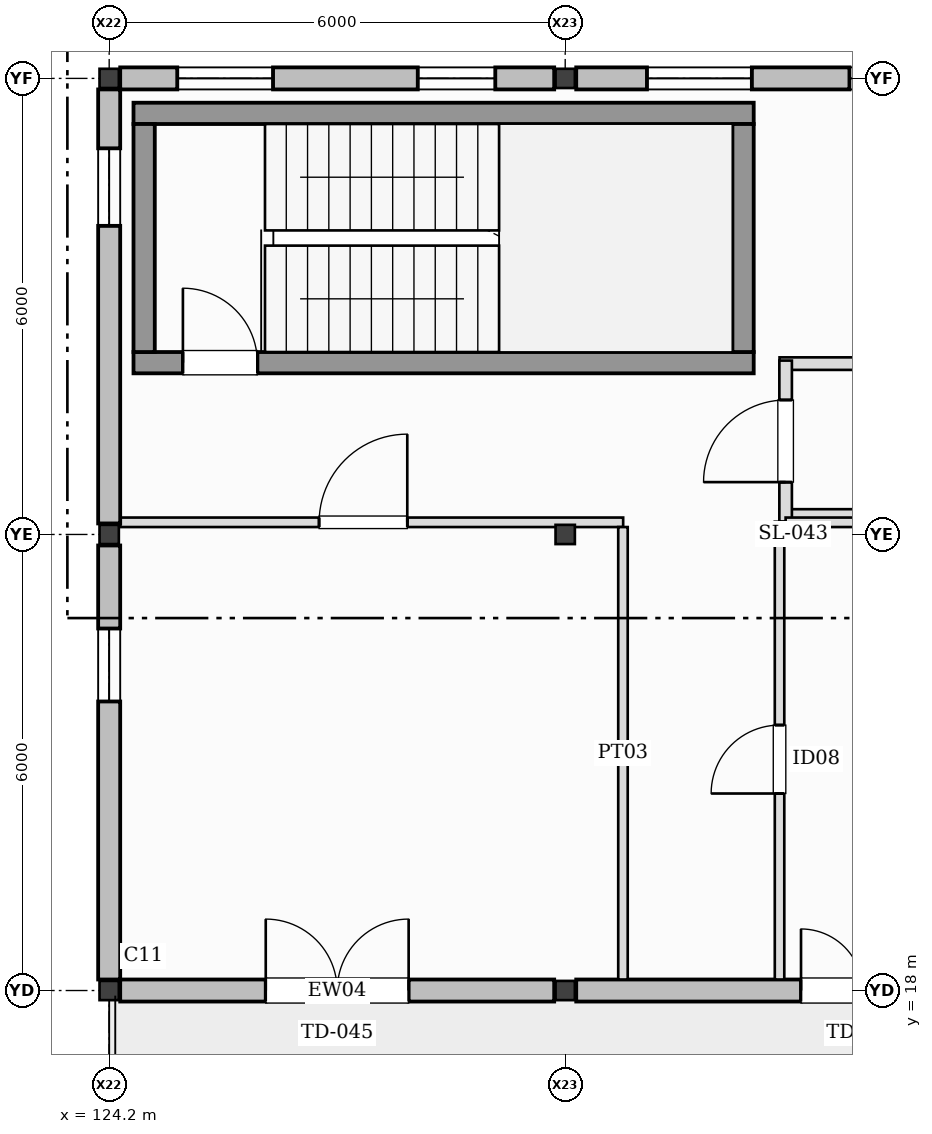
"""IFC4 building model, lengths in metres.
Left out: names, types, materials, properties, quantities, classifications, styles, units other than length and angle.
Written with IfcOpenShell. Run it as: python <this file> out.ifc"""

import sys

from ifc_helpers import new_model, si_unit, direction, frame, frame_2d, origin, origin_2d, place, context, subcontext, project, spatial, rectangle, i_section, extrude, element, fill, save


model = new_model("IFC4")
c1 = context("Model", 3, precision=1e-05, world=origin(), true_north=direction((0.0, 1.0)))
c2 = subcontext(c1, "Body", "Model", "MODEL_VIEW")
j1 = project(units=[si_unit("LENGTHUNIT", "METRE"), si_unit("PLANEANGLEUNIT", "RADIAN")], contexts=[c1])
p1 = place(None, origin())
s1 = spatial("IfcSite", under=j1, at=p1, CompositionType="ELEMENT")
p2 = place(p1, origin())
s2 = spatial("IfcBuilding", under=s1, at=p2, CompositionType="ELEMENT")
p3 = place(p2, frame((0.0, 0.0, 10.0)))
s3 = spatial("IfcBuildingStorey", under=s2, at=p3, CompositionType="ELEMENT", Elevation=10.0)
for number, where, z_axis, x_axis in (
    (1, (124.2, 18.0, 0.0), (0.0, 0.0, 1.0), (1.0, 0.0, 0.0)),
    (2, (124.2, 24.0, 0.0), (0.0, 0.0, 1.0), (1.0, 0.0, 0.0)),
    (3, (124.2, 30.0, 0.0), (0.0, 0.0, 1.0), (1.0, 0.0, 0.0)),
    (4, (130.2, 18.0, 0.0), (0.0, 0.0, 1.0), (1.0, 0.0, 0.0)),
    (5, (130.2, 24.0, 0.0), (0.0, 0.0, 1.0), (1.0, 0.0, 0.0)),
    (6, (130.2, 30.0, 0.0), (0.0, 0.0, 1.0), (1.0, 0.0, 0.0)),
):
    element("IfcColumn", number, at=place(p3, frame(where, z_axis=z_axis, x_axis=x_axis)), inside=s3, PredefinedType="COLUMN", context=c2, shape_type="SweptSolid", body=[
        extrude(i_section(OverallWidth=0.254, OverallDepth=0.253, WebThickness=0.009, FlangeThickness=0.014, at=origin_2d()), origin(), (0.0, 0.0, 1.0), 4.0),
    ])
p4 = place(p3, frame((124.345, 18.0, 0.0), z_axis=(0.0, 0.0, 1.0), x_axis=(1.0, 0.0, 0.0)))
e7 = element("IfcWall", 7, at=p4, inside=s3, PredefinedType="STANDARD", context=c2, shape_type="SweptSolid", body=[
    extrude(rectangle(XDim=5.71, YDim=0.29, at=frame_2d((2.855, 0.0))), origin(), (0.0, 0.0, 1.0), 4.0),
])
p5 = place(p4, frame((1.915, 0.0, 0.0)))
e8 = element("IfcOpeningElement", 8, at=p5, cuts=e7, PredefinedType="OPENING", context=c2, shape_type="SweptSolid", body=[
    extrude(rectangle(XDim=1.88, YDim=2.28, at=frame_2d((0.94, 1.14))), frame((0.0, 0.155, 0.0), z_axis=(0.0, -1.0, 0.0), x_axis=(1.0, 0.0, 0.0)), (0.0, 0.0, 1.0), 0.31),
])
p6 = place(p3, frame((130.345, 18.0, 0.0), z_axis=(0.0, 0.0, 1.0), x_axis=(1.0, 0.0, 0.0)))
e9 = element("IfcWall", 9, at=p6, inside=s3, PredefinedType="STANDARD", context=c2, shape_type="SweptSolid", body=[
    extrude(rectangle(XDim=5.71, YDim=0.29, at=frame_2d((2.855, 0.0))), origin(), (0.0, 0.0, 1.0), 4.0),
])
p7 = place(p6, frame((2.958, 0.0, 0.0)))
e10 = element("IfcOpeningElement", 10, at=p7, cuts=e9, PredefinedType="OPENING", context=c2, shape_type="SweptSolid", body=[
    extrude(rectangle(XDim=1.62, YDim=2.2, at=frame_2d((0.81, 1.1))), frame((0.0, 0.155, 0.0), z_axis=(0.0, -1.0, 0.0), x_axis=(1.0, 0.0, 0.0)), (0.0, 0.0, 1.0), 0.31),
])
p8 = place(p3, frame((130.055, 30.0, 0.0), z_axis=(0.0, 0.0, 1.0), x_axis=(-1.0, 0.0, 0.0)))
e11 = element("IfcWall", 11, at=p8, inside=s3, PredefinedType="STANDARD", context=c2, shape_type="SweptSolid", body=[
    extrude(rectangle(XDim=5.71, YDim=0.29, at=frame_2d((2.855, 0.0))), origin(), (0.0, 0.0, 1.0), 4.0),
])
p9 = place(p8, frame((0.775, 0.0, 1.18)))
e12 = element("IfcOpeningElement", 12, at=p9, cuts=e11, PredefinedType="OPENING", context=c2, shape_type="SweptSolid", body=[
    extrude(rectangle(XDim=1.02, YDim=1.02, at=frame_2d((0.51, 0.51))), frame((0.0, 0.155, 0.0), z_axis=(0.0, -1.0, 0.0), x_axis=(1.0, 0.0, 0.0)), (0.0, 0.0, 1.0), 0.31),
])
p10 = place(p8, frame((3.699, 0.0, 0.96)))
e13 = element("IfcOpeningElement", 13, at=p10, cuts=e11, PredefinedType="OPENING", context=c2, shape_type="SweptSolid", body=[
    extrude(rectangle(XDim=1.26, YDim=1.26, at=frame_2d((0.63, 0.63))), frame((0.0, 0.155, 0.0), z_axis=(0.0, -1.0, 0.0), x_axis=(1.0, 0.0, 0.0)), (0.0, 0.0, 1.0), 0.31),
])
p11 = place(p3, frame((136.055, 30.0, 0.0), z_axis=(0.0, 0.0, 1.0), x_axis=(-1.0, 0.0, 0.0)))
e14 = element("IfcWall", 14, at=p11, inside=s3, PredefinedType="STANDARD", context=c2, shape_type="SweptSolid", body=[
    extrude(rectangle(XDim=5.71, YDim=0.29, at=frame_2d((2.855, 0.0))), origin(), (0.0, 0.0, 1.0), 4.0),
])
p12 = place(p11, frame((0.975, 0.0, 1.42)))
e15 = element("IfcOpeningElement", 15, at=p12, cuts=e14, PredefinedType="OPENING", context=c2, shape_type="SweptSolid", body=[
    extrude(rectangle(XDim=1.14, YDim=1.14, at=frame_2d((0.57, 0.57))), frame((0.0, 0.155, 0.0), z_axis=(0.0, -1.0, 0.0), x_axis=(1.0, 0.0, 0.0)), (0.0, 0.0, 1.0), 0.31),
])
p13 = place(p11, frame((3.399, 0.0, 1.28)))
e16 = element("IfcOpeningElement", 16, at=p13, cuts=e14, PredefinedType="OPENING", context=c2, shape_type="SweptSolid", body=[
    extrude(rectangle(XDim=1.38, YDim=1.38, at=frame_2d((0.69, 0.69))), frame((0.0, 0.155, 0.0), z_axis=(0.0, -1.0, 0.0), x_axis=(1.0, 0.0, 0.0)), (0.0, 0.0, 1.0), 0.31),
])
p14 = place(p3, frame((124.2, 23.855, 0.0), z_axis=(0.0, 0.0, 1.0), x_axis=(0.0, -1.0, 0.0)))
e17 = element("IfcWall", 17, at=p14, inside=s3, PredefinedType="STANDARD", context=c2, shape_type="SweptSolid", body=[
    extrude(rectangle(XDim=5.71, YDim=0.29, at=frame_2d((2.855, 0.0))), origin(), (0.0, 0.0, 1.0), 2.1),
])
p15 = place(p14, frame((1.092, 0.0, 0.82)))
e18 = element("IfcOpeningElement", 18, at=p15, cuts=e17, PredefinedType="OPENING", context=c2, shape_type="SweptSolid", body=[
    extrude(rectangle(XDim=0.96, YDim=0.96, at=frame_2d((0.48, 0.48))), frame((0.0, 0.155, 0.0), z_axis=(0.0, -1.0, 0.0), x_axis=(1.0, 0.0, 0.0)), (0.0, 0.0, 1.0), 0.31),
])
p16 = place(p3, frame((124.2, 29.855, 0.0), z_axis=(0.0, 0.0, 1.0), x_axis=(0.0, -1.0, 0.0)))
e19 = element("IfcWall", 19, at=p16, inside=s3, PredefinedType="STANDARD", context=c2, shape_type="SweptSolid", body=[
    extrude(rectangle(XDim=5.71, YDim=0.29, at=frame_2d((2.855, 0.0))), origin(), (0.0, 0.0, 1.0), 2.1),
])
p17 = place(p16, frame((0.775, 0.0, 0.82)))
e20 = element("IfcOpeningElement", 20, at=p17, cuts=e19, PredefinedType="OPENING", context=c2, shape_type="SweptSolid", body=[
    extrude(rectangle(XDim=1.02, YDim=1.02, at=frame_2d((0.51, 0.51))), frame((0.0, 0.155, 0.0), z_axis=(0.0, -1.0, 0.0), x_axis=(1.0, 0.0, 0.0)), (0.0, 0.0, 1.0), 0.31),
])
p18 = place(p2, frame((0.0, 0.0, 25.2)))
s4 = spatial("IfcBuildingStorey", under=s2, at=p18, CompositionType="ELEMENT", Elevation=25.2)
for number, where, z_axis, x_axis in (
    (21, (122.973, 18.0, -15.2), (0.0, 0.0, 1.0), (1.0, 0.0, 0.0)),
    (22, (124.155, 30.0, -15.2), (0.0, 0.0, 1.0), (-1.0, 0.0, 0.0)),
):
    element("IfcWall", number, at=place(p18, frame(where, z_axis=z_axis, x_axis=x_axis)), inside=s4, PredefinedType="STANDARD", context=c2, shape_type="SweptSolid", body=[
        extrude(rectangle(XDim=1.182, YDim=0.265, at=frame_2d((0.591, 0.0))), origin(), (0.0, 0.0, 1.0), 2.417),
    ])
p19 = place(p3, frame((124.52, 26.26, 0.0), z_axis=(0.0, 0.0, 1.0), x_axis=(1.0, 0.0, 0.0)))
e23 = element("IfcWall", 23, at=p19, inside=s3, PredefinedType="SHEAR", context=c2, shape_type="SweptSolid", body=[
    extrude(rectangle(XDim=8.16, YDim=0.28, at=frame_2d((4.08, 0.0))), origin(), (0.0, 0.0, 1.0), 3.75),
])
p20 = place(p19, frame((0.65, 0.0, 0.0)))
e24 = element("IfcOpeningElement", 24, at=p20, cuts=e23, PredefinedType="OPENING", context=c2, shape_type="SweptSolid", body=[
    extrude(rectangle(XDim=0.98, YDim=2.15, at=frame_2d((0.49, 1.075))), frame((0.0, 0.15, 0.0), z_axis=(0.0, -1.0, 0.0), x_axis=(1.0, 0.0, 0.0)), (0.0, 0.0, 1.0), 0.3),
])
p21 = place(p3, frame((132.68, 29.54, 0.0), z_axis=(0.0, 0.0, 1.0), x_axis=(-1.0, 0.0, 0.0)))
e25 = element("IfcWall", 25, at=p21, inside=s3, PredefinedType="SHEAR", context=c2, shape_type="SweptSolid", body=[
    extrude(rectangle(XDim=8.16, YDim=0.28, at=frame_2d((4.08, 0.0))), origin(), (0.0, 0.0, 1.0), 3.75),
])
for number, where, z_axis, x_axis in (
    (26, (124.66, 29.4, 0.0), (0.0, 0.0, 1.0), (0.0, -1.0, 0.0)),
    (27, (132.54, 26.4, 0.0), (0.0, 0.0, 1.0), (0.0, 1.0, 0.0)),
):
    element("IfcWall", number, at=place(p3, frame(where, z_axis=z_axis, x_axis=x_axis)), inside=s3, PredefinedType="SHEAR", context=c2, shape_type="SweptSolid", body=[
        extrude(rectangle(XDim=3.0, YDim=0.28, at=frame_2d((1.5, 0.0))), origin(), (0.0, 0.0, 1.0), 3.75),
    ])
p22 = place(p3, frame((133.02, 24.25, 0.0), z_axis=(0.0, 0.0, 1.0), x_axis=(1.0, 0.0, 0.0)))
e28 = element("IfcWall", 28, at=p22, inside=s3, PredefinedType="PARTITIONING", context=c2, shape_type="SweptSolid", body=[
    extrude(rectangle(XDim=5.16, YDim=0.165, at=frame_2d((2.58, 0.0))), origin(), (0.0, 0.0, 1.0), 3.74),
])
p23 = place(p3, frame((133.02, 26.248, 0.0), z_axis=(0.0, 0.0, 1.0), x_axis=(1.0, 0.0, 0.0)))
e29 = element("IfcWall", 29, at=p23, inside=s3, PredefinedType="PARTITIONING", context=c2, shape_type="SweptSolid", body=[
    extrude(rectangle(XDim=1.115, YDim=0.165, at=frame_2d((0.558, 0.0))), origin(), (0.0, 0.0, 1.0), 3.74),
])
p24 = place(p3, frame((133.1, 24.17, 0.0), z_axis=(0.0, 0.0, 1.0), x_axis=(0.0, 1.0, 0.0)))
e30 = element("IfcWall", 30, at=p24, inside=s3, PredefinedType="PARTITIONING", context=c2, shape_type="SweptSolid", body=[
    extrude(rectangle(XDim=2.118, YDim=0.165, at=frame_2d((1.059, 0.0))), origin(), (0.0, 0.0, 1.0), 3.74),
])
p25 = place(p24, frame((0.519, 0.0, 0.0)))
e31 = element("IfcOpeningElement", 31, at=p25, cuts=e30, PredefinedType="OPENING", context=c2, shape_type="SweptSolid", body=[
    extrude(rectangle(XDim=1.08, YDim=2.14, at=frame_2d((0.54, 1.07))), frame((0.0, 0.093, 0.0), z_axis=(0.0, -1.0, 0.0), x_axis=(1.0, 0.0, 0.0)), (0.0, 0.0, 1.0), 0.185),
])
p26 = place(p3, frame((124.345, 24.16, 0.0), z_axis=(0.0, 0.0, 1.0), x_axis=(1.0, 0.0, 0.0)))
e32 = element("IfcWall", 32, at=p26, inside=s3, PredefinedType="PARTITIONING", context=c2, shape_type="SweptSolid", body=[
    extrude(rectangle(XDim=6.617, YDim=0.125, at=frame_2d((3.309, 0.0))), origin(), (0.0, 0.0, 1.0), 3.74),
])
p27 = place(p26, frame((2.617, 0.0, 0.0)))
e33 = element("IfcOpeningElement", 33, at=p27, cuts=e32, PredefinedType="OPENING", context=c2, shape_type="SweptSolid", body=[
    extrude(rectangle(XDim=1.16, YDim=2.2, at=frame_2d((0.58, 1.1))), frame((0.0, 0.073, 0.0), z_axis=(0.0, -1.0, 0.0), x_axis=(1.0, 0.0, 0.0)), (0.0, 0.0, 1.0), 0.145),
])
p28 = place(p3, frame((130.96, 24.097, 0.0), z_axis=(0.0, 0.0, 1.0), x_axis=(0.0, -1.0, 0.0)))
e34 = element("IfcWall", 34, at=p28, inside=s3, PredefinedType="PARTITIONING", context=c2, shape_type="SweptSolid", body=[
    extrude(rectangle(XDim=5.952, YDim=0.125, at=frame_2d((2.976, 0.0))), origin(), (0.0, 0.0, 1.0), 3.74),
])
p29 = place(p3, frame((133.02, 18.145, 0.0), z_axis=(0.0, 0.0, 1.0), x_axis=(0.0, 1.0, 0.0)))
e35 = element("IfcWall", 35, at=p29, inside=s3, PredefinedType="PARTITIONING", context=c2, shape_type="SweptSolid", body=[
    extrude(rectangle(XDim=6.022, YDim=0.125, at=frame_2d((3.011, 0.0))), origin(), (0.0, 0.0, 1.0), 3.74),
])
p30 = place(p29, frame((2.447, 0.0, 0.0)))
e36 = element("IfcOpeningElement", 36, at=p30, cuts=e35, PredefinedType="OPENING", context=c2, shape_type="SweptSolid", body=[
    extrude(rectangle(XDim=0.9, YDim=2.1, at=frame_2d((0.45, 1.05))), frame((0.0, 0.073, 0.0), z_axis=(0.0, -1.0, 0.0), x_axis=(1.0, 0.0, 0.0)), (0.0, 0.0, 1.0), 0.145),
])
p31 = place(p3, frame((133.1, 24.16, 0.0), z_axis=(0.0, 0.0, 1.0), x_axis=(1.0, 0.0, 0.0)))
e37 = element("IfcWall", 37, at=p31, inside=s3, PredefinedType="PARTITIONING", context=c2, shape_type="SweptSolid", body=[
    extrude(rectangle(XDim=16.782, YDim=0.125, at=frame_2d((8.391, 0.0))), origin(), (0.0, 0.0, 1.0), 3.74),
])
p32 = place(p5, frame((1.88, 0.0, 0.0), z_axis=(0.0, 0.0, 1.0), x_axis=(-1.0, 0.0, 0.0)))
e38 = element("IfcDoor", 38, at=p32, inside=s3, OperationType="DOUBLE_DOOR_SINGLE_SWING", PredefinedType="DOOR", context=c2, shape_type="SweptSolid", body=[
    extrude(rectangle(XDim=1.88, YDim=2.28, at=frame_2d((0.94, 1.14))), frame((0.0, 0.025, 0.0), z_axis=(0.0, -1.0, 0.0), x_axis=(1.0, 0.0, 0.0)), (0.0, 0.0, 1.0), 0.05),
])
fill(e8, e38)
p33 = place(p7, frame((1.62, 0.0, 0.0), z_axis=(0.0, 0.0, 1.0), x_axis=(-1.0, 0.0, 0.0)))
e39 = element("IfcDoor", 39, at=p33, inside=s3, OperationType="DOUBLE_DOOR_SINGLE_SWING", PredefinedType="DOOR", context=c2, shape_type="SweptSolid", body=[
    extrude(rectangle(XDim=1.62, YDim=2.2, at=frame_2d((0.81, 1.1))), frame((0.0, 0.025, 0.0), z_axis=(0.0, -1.0, 0.0), x_axis=(1.0, 0.0, 0.0)), (0.0, 0.0, 1.0), 0.05),
])
fill(e10, e39)
p34 = place(p9, origin())
e40 = element("IfcWindow", 40, at=p34, inside=s3, PartitioningType="SINGLE_PANEL", PredefinedType="WINDOW", context=c2, shape_type="SweptSolid", body=[
    extrude(rectangle(XDim=1.02, YDim=1.02, at=frame_2d((0.51, 0.51))), frame((0.0, 0.03, 0.0), z_axis=(0.0, -1.0, 0.0), x_axis=(1.0, 0.0, 0.0)), (0.0, 0.0, 1.0), 0.06),
])
fill(e12, e40)
p35 = place(p10, origin())
e41 = element("IfcWindow", 41, at=p35, inside=s3, PartitioningType="SINGLE_PANEL", PredefinedType="WINDOW", context=c2, shape_type="SweptSolid", body=[
    extrude(rectangle(XDim=1.26, YDim=1.26, at=frame_2d((0.63, 0.63))), frame((0.0, 0.03, 0.0), z_axis=(0.0, -1.0, 0.0), x_axis=(1.0, 0.0, 0.0)), (0.0, 0.0, 1.0), 0.06),
])
fill(e13, e41)
p36 = place(p12, origin())
e42 = element("IfcWindow", 42, at=p36, inside=s3, PartitioningType="SINGLE_PANEL", PredefinedType="WINDOW", context=c2, shape_type="SweptSolid", body=[
    extrude(rectangle(XDim=1.14, YDim=1.14, at=frame_2d((0.57, 0.57))), frame((0.0, 0.03, 0.0), z_axis=(0.0, -1.0, 0.0), x_axis=(1.0, 0.0, 0.0)), (0.0, 0.0, 1.0), 0.06),
])
fill(e15, e42)
p37 = place(p13, origin())
e43 = element("IfcWindow", 43, at=p37, inside=s3, PartitioningType="SINGLE_PANEL", PredefinedType="WINDOW", context=c2, shape_type="SweptSolid", body=[
    extrude(rectangle(XDim=1.38, YDim=1.38, at=frame_2d((0.69, 0.69))), frame((0.0, 0.03, 0.0), z_axis=(0.0, -1.0, 0.0), x_axis=(1.0, 0.0, 0.0)), (0.0, 0.0, 1.0), 0.06),
])
fill(e16, e43)
p38 = place(p15, origin())
e44 = element("IfcWindow", 44, at=p38, inside=s3, PartitioningType="SINGLE_PANEL", PredefinedType="WINDOW", context=c2, shape_type="SweptSolid", body=[
    extrude(rectangle(XDim=0.96, YDim=0.96, at=frame_2d((0.48, 0.48))), frame((0.0, 0.03, 0.0), z_axis=(0.0, -1.0, 0.0), x_axis=(1.0, 0.0, 0.0)), (0.0, 0.0, 1.0), 0.06),
])
fill(e18, e44)
p39 = place(p17, origin())
e45 = element("IfcWindow", 45, at=p39, inside=s3, PartitioningType="SINGLE_PANEL", PredefinedType="WINDOW", context=c2, shape_type="SweptSolid", body=[
    extrude(rectangle(XDim=1.02, YDim=1.02, at=frame_2d((0.51, 0.51))), frame((0.0, 0.03, 0.0), z_axis=(0.0, -1.0, 0.0), x_axis=(1.0, 0.0, 0.0)), (0.0, 0.0, 1.0), 0.06),
])
fill(e20, e45)
p40 = place(p20, origin())
e46 = element("IfcDoor", 46, at=p40, inside=s3, OperationType="SINGLE_SWING_LEFT", PredefinedType="DOOR", context=c2, shape_type="SweptSolid", body=[
    extrude(rectangle(XDim=0.98, YDim=2.15, at=frame_2d((0.49, 1.075))), frame((0.0, 0.025, 0.0), z_axis=(0.0, -1.0, 0.0), x_axis=(1.0, 0.0, 0.0)), (0.0, 0.0, 1.0), 0.05),
])
fill(e24, e46)
p41 = place(p25, frame((1.08, 0.0, 0.0), z_axis=(0.0, 0.0, 1.0), x_axis=(-1.0, 0.0, 0.0)))
e47 = element("IfcDoor", 47, at=p41, inside=s3, OperationType="SINGLE_SWING_LEFT", PredefinedType="DOOR", context=c2, shape_type="SweptSolid", body=[
    extrude(rectangle(XDim=1.08, YDim=2.14, at=frame_2d((0.54, 1.07))), frame((0.0, 0.025, 0.0), z_axis=(0.0, -1.0, 0.0), x_axis=(1.0, 0.0, 0.0)), (0.0, 0.0, 1.0), 0.05),
])
fill(e31, e47)
p42 = place(p27, frame((1.16, 0.0, 0.0), z_axis=(0.0, 0.0, 1.0), x_axis=(-1.0, 0.0, 0.0)))
e48 = element("IfcDoor", 48, at=p42, inside=s3, OperationType="SINGLE_SWING_RIGHT", PredefinedType="DOOR", context=c2, shape_type="SweptSolid", body=[
    extrude(rectangle(XDim=1.16, YDim=2.2, at=frame_2d((0.58, 1.1))), frame((0.0, 0.025, 0.0), z_axis=(0.0, -1.0, 0.0), x_axis=(1.0, 0.0, 0.0)), (0.0, 0.0, 1.0), 0.05),
])
fill(e33, e48)
p43 = place(p30, frame((0.9, 0.0, 0.0), z_axis=(0.0, 0.0, 1.0), x_axis=(-1.0, 0.0, 0.0)))
e49 = element("IfcDoor", 49, at=p43, inside=s3, OperationType="SINGLE_SWING_LEFT", PredefinedType="DOOR", context=c2, shape_type="SweptSolid", body=[
    extrude(rectangle(XDim=0.9, YDim=2.1, at=frame_2d((0.45, 1.05))), frame((0.0, 0.025, 0.0), z_axis=(0.0, -1.0, 0.0), x_axis=(1.0, 0.0, 0.0)), (0.0, 0.0, 1.0), 0.05),
])
fill(e36, e49)
save(model, sys.argv[1])
